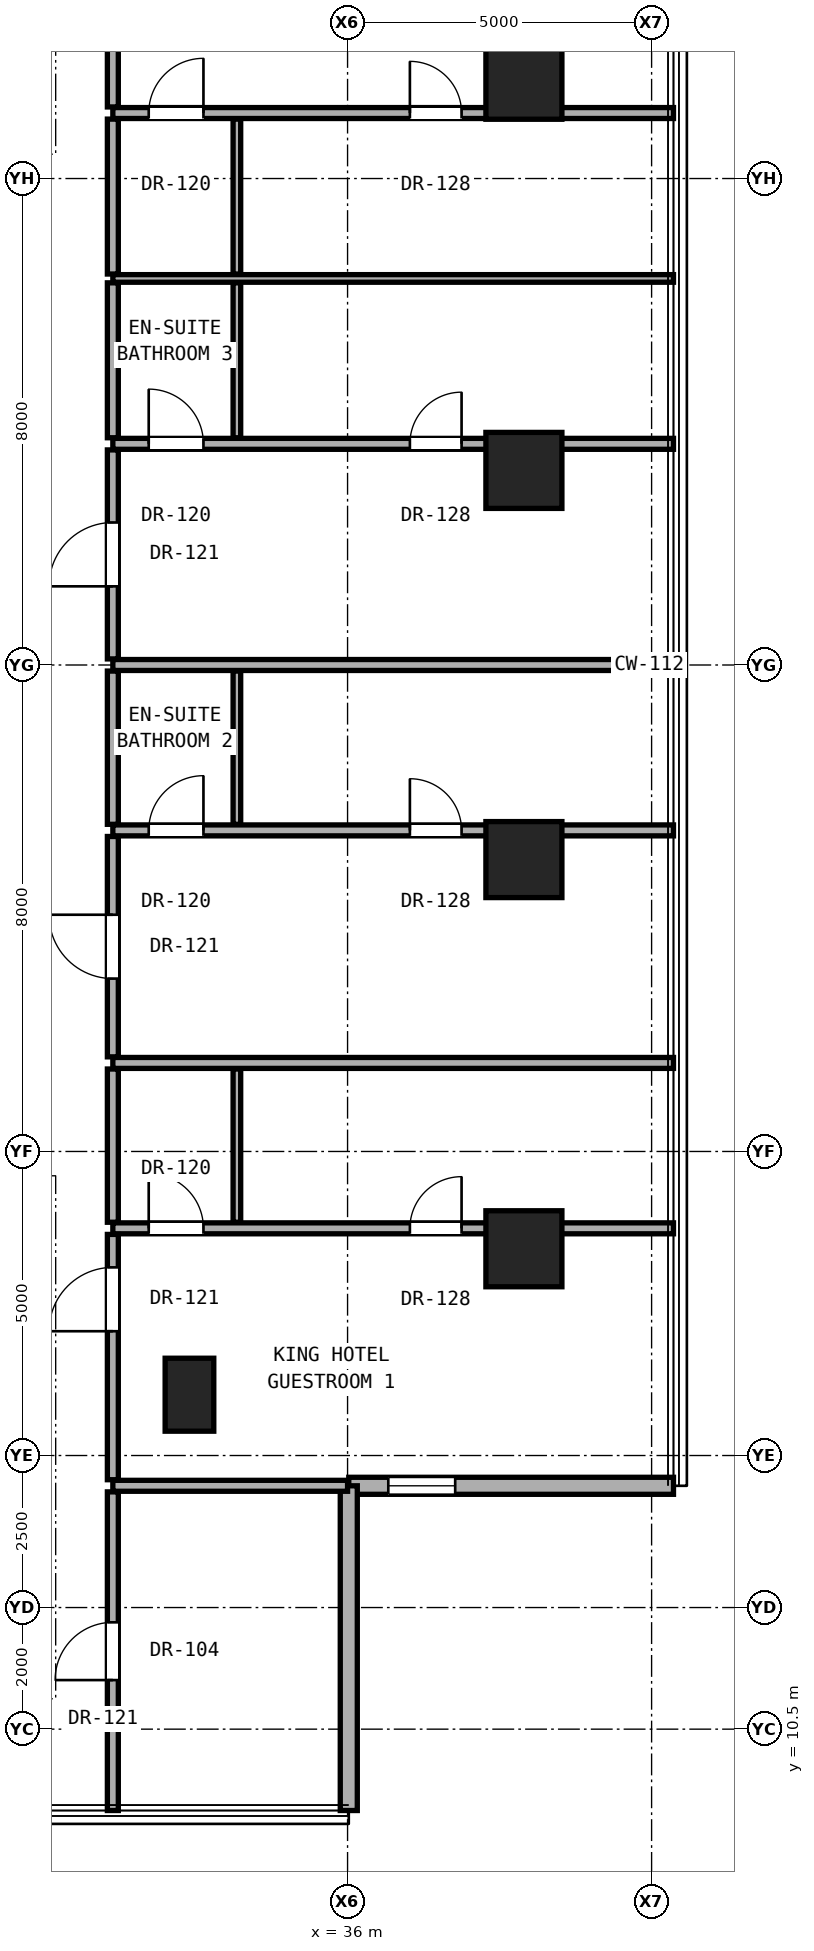
"""IFC4 building model, lengths in metres.
Left out: names, types, materials, properties, quantities, classifications, styles, units other than length and angle.
Written with IfcOpenShell. Run it as: python <this file> out.ifc"""

import sys

from ifc_helpers import new_model, si_unit, direction, frame, frame_2d, origin, origin_2d, place, context, subcontext, project, spatial, rectangle, hollow_rectangle, extrude, element, fill, save


model = new_model("IFC4")
c1 = context("Model", 3, precision=1e-05, world=origin(), true_north=direction((0.0, 1.0)))
c2 = subcontext(c1, "Body", "Model", "MODEL_VIEW")
j1 = project(units=[si_unit("LENGTHUNIT", "METRE"), si_unit("PLANEANGLEUNIT", "RADIAN")], contexts=[c1])
p1 = place(None, origin())
s1 = spatial("IfcSite", under=j1, at=p1, CompositionType="ELEMENT")
p2 = place(p1, origin())
s2 = spatial("IfcBuilding", under=s1, at=p2, CompositionType="ELEMENT")
p3 = place(p2, frame((0.0, 0.0, 55.4)))
s3 = spatial("IfcBuildingStorey", under=s2, at=p3, CompositionType="ELEMENT", Elevation=55.4)
for number, where, z_axis, x_axis in (
    (1, (38.9, 18.4, 0.0), (0.0, 0.0, 1.0), (1.0, 0.0, 0.0)),
    (2, (38.9, 24.8, 0.0), (0.0, 0.0, 1.0), (1.0, 0.0, 0.0)),
    (3, (38.9, 31.2, 0.0), (0.0, 0.0, 1.0), (1.0, 0.0, 0.0)),
    (4, (38.9, 37.6, 0.0), (0.0, 0.0, 1.0), (1.0, 0.0, 0.0)),
):
    element("IfcColumn", number, at=place(p3, frame(where, z_axis=z_axis, x_axis=x_axis)), inside=s3, PredefinedType="COLUMN", context=c2, shape_type="SweptSolid", body=[
        extrude(hollow_rectangle(XDim=1.25, YDim=1.25, WallThickness=0.07, at=origin_2d()), origin(), (0.0, 0.0, 1.0), 3.3),
    ])
p4 = place(p3, frame((33.4, 16.0, 0.0), z_axis=(0.0, 0.0, 1.0), x_axis=(1.0, 0.0, 0.0)))
e5 = element("IfcColumn", 5, at=p4, inside=s3, PredefinedType="PILASTER", context=c2, shape_type="SweptSolid", body=[
    extrude(rectangle(XDim=0.8, YDim=1.2, at=origin_2d()), origin(), (0.0, 0.0, 1.0), 3.3),
])
p5 = place(p3, frame((36.02, 14.502, 0.0), z_axis=(0.0, 0.0, 1.0), x_axis=(1.0, 0.0, 0.0)))
e6 = element("IfcWall", 6, at=p5, inside=s3, PredefinedType="SOLIDWALL", context=c2, shape_type="SweptSolid", body=[
    extrude(rectangle(XDim=5.34, YDim=0.28, at=frame_2d((2.67, 0.0))), origin(), (0.0, 0.0, 1.0), 3.04),
])
p6 = place(p5, frame((0.65, 0.0, 0.85)))
e7 = element("IfcOpeningElement", 7, at=p6, cuts=e6, PredefinedType="OPENING", context=c2, shape_type="SweptSolid", body=[
    extrude(rectangle(XDim=1.1, YDim=2.0, at=frame_2d((0.55, 1.0))), frame((0.0, 0.15, 0.0), z_axis=(0.0, -1.0, 0.0), x_axis=(1.0, 0.0, 0.0)), (0.0, 0.0, 1.0), 0.3),
])
p7 = place(p3, frame((36.02, 9.162, 0.0), z_axis=(0.0, 0.0, 1.0), x_axis=(0.0, 1.0, 0.0)))
e8 = element("IfcWall", 8, at=p7, inside=s3, PredefinedType="SOLIDWALL", context=c2, shape_type="SweptSolid", body=[
    extrude(rectangle(XDim=5.34, YDim=0.28, at=frame_2d((2.67, 0.0))), origin(), (0.0, 0.0, 1.0), 3.04),
])
p8 = place(p3, frame((32.14, 14.502, 0.0), z_axis=(0.0, 0.0, 1.0), x_axis=(1.0, 0.0, 0.0)))
e9 = element("IfcWall", 9, at=p8, inside=s3, PredefinedType="PARTITIONING", context=c2, shape_type="SweptSolid", body=[
    extrude(rectangle(XDim=3.86, YDim=0.18, at=frame_2d((1.93, 0.0))), origin(), (0.0, 0.0, 1.0), 3.06),
])
p9 = place(p3, frame((32.14, 18.736, 0.0), z_axis=(0.0, 0.0, 1.0), x_axis=(1.0, 0.0, 0.0)))
e10 = element("IfcWall", 10, at=p9, inside=s3, PredefinedType="PARTITIONING", context=c2, shape_type="SweptSolid", body=[
    extrude(rectangle(XDim=9.22, YDim=0.18, at=frame_2d((4.61, 0.0))), origin(), (0.0, 0.0, 1.0), 2.125),
])
p10 = place(p9, frame((4.885, 0.0, 0.0)))
e11 = element("IfcOpeningElement", 11, at=p10, cuts=e10, PredefinedType="OPENING", context=c2, shape_type="SweptSolid", body=[
    extrude(rectangle(XDim=0.85, YDim=2.01, at=frame_2d((0.425, 1.005))), frame((0.0, 0.1, 0.0), z_axis=(0.0, -1.0, 0.0), x_axis=(1.0, 0.0, 0.0)), (0.0, 0.0, 1.0), 0.2),
])
p11 = place(p9, frame((0.59, 0.0, 0.0)))
e12 = element("IfcOpeningElement", 12, at=p11, cuts=e10, PredefinedType="OPENING", context=c2, shape_type="SweptSolid", body=[
    extrude(rectangle(XDim=0.9, YDim=2.1, at=frame_2d((0.45, 1.05))), frame((0.0, 0.1, 0.0), z_axis=(0.0, -1.0, 0.0), x_axis=(1.0, 0.0, 0.0)), (0.0, 0.0, 1.0), 0.2),
])
p12 = place(p3, frame((32.14, 21.456, 0.0), z_axis=(0.0, 0.0, 1.0), x_axis=(1.0, 0.0, 0.0)))
e13 = element("IfcWall", 13, at=p12, inside=s3, PredefinedType="PARTITIONING", context=c2, shape_type="SweptSolid", body=[
    extrude(rectangle(XDim=9.22, YDim=0.18, at=frame_2d((4.61, 0.0))), origin(), (0.0, 0.0, 1.0), 2.125),
])
p13 = place(p3, frame((32.14, 25.28, 0.0), z_axis=(0.0, 0.0, 1.0), x_axis=(1.0, 0.0, 0.0)))
e14 = element("IfcWall", 14, at=p13, inside=s3, PredefinedType="PARTITIONING", context=c2, shape_type="SweptSolid", body=[
    extrude(rectangle(XDim=9.22, YDim=0.18, at=frame_2d((4.61, 0.0))), origin(), (0.0, 0.0, 1.0), 2.125),
])
p14 = place(p13, frame((4.885, 0.0, 0.0)))
e15 = element("IfcOpeningElement", 15, at=p14, cuts=e14, PredefinedType="OPENING", context=c2, shape_type="SweptSolid", body=[
    extrude(rectangle(XDim=0.85, YDim=2.01, at=frame_2d((0.425, 1.005))), frame((0.0, 0.1, 0.0), z_axis=(0.0, -1.0, 0.0), x_axis=(1.0, 0.0, 0.0)), (0.0, 0.0, 1.0), 0.2),
])
p15 = place(p13, frame((0.59, 0.0, 0.0)))
e16 = element("IfcOpeningElement", 16, at=p15, cuts=e14, PredefinedType="OPENING", context=c2, shape_type="SweptSolid", body=[
    extrude(rectangle(XDim=0.9, YDim=2.1, at=frame_2d((0.45, 1.05))), frame((0.0, 0.1, 0.0), z_axis=(0.0, -1.0, 0.0), x_axis=(1.0, 0.0, 0.0)), (0.0, 0.0, 1.0), 0.2),
])
p16 = place(p3, frame((32.14, 28.0, 0.0), z_axis=(0.0, 0.0, 1.0), x_axis=(1.0, 0.0, 0.0)))
e17 = element("IfcWall", 17, at=p16, inside=s3, PredefinedType="PARTITIONING", context=c2, shape_type="SweptSolid", body=[
    extrude(rectangle(XDim=9.22, YDim=0.18, at=frame_2d((4.61, 0.0))), origin(), (0.0, 0.0, 1.0), 2.125),
])
p17 = place(p3, frame((32.14, 31.637, 0.0), z_axis=(0.0, 0.0, 1.0), x_axis=(1.0, 0.0, 0.0)))
e18 = element("IfcWall", 18, at=p17, inside=s3, PredefinedType="PARTITIONING", context=c2, shape_type="SweptSolid", body=[
    extrude(rectangle(XDim=9.22, YDim=0.18, at=frame_2d((4.61, 0.0))), origin(), (0.0, 0.0, 1.0), 2.125),
])
p18 = place(p17, frame((4.885, 0.0, 0.0)))
e19 = element("IfcOpeningElement", 19, at=p18, cuts=e18, PredefinedType="OPENING", context=c2, shape_type="SweptSolid", body=[
    extrude(rectangle(XDim=0.85, YDim=2.01, at=frame_2d((0.425, 1.005))), frame((0.0, 0.1, 0.0), z_axis=(0.0, -1.0, 0.0), x_axis=(1.0, 0.0, 0.0)), (0.0, 0.0, 1.0), 0.2),
])
p19 = place(p17, frame((0.59, 0.0, 0.0)))
e20 = element("IfcOpeningElement", 20, at=p19, cuts=e18, PredefinedType="OPENING", context=c2, shape_type="SweptSolid", body=[
    extrude(rectangle(XDim=0.9, YDim=2.1, at=frame_2d((0.45, 1.05))), frame((0.0, 0.1, 0.0), z_axis=(0.0, -1.0, 0.0), x_axis=(1.0, 0.0, 0.0)), (0.0, 0.0, 1.0), 0.2),
])
p20 = place(p3, frame((32.14, 34.357, 0.0), z_axis=(0.0, 0.0, 1.0), x_axis=(1.0, 0.0, 0.0)))
e21 = element("IfcWall", 21, at=p20, inside=s3, PredefinedType="PARTITIONING", context=c2, shape_type="SweptSolid", body=[
    extrude(rectangle(XDim=9.22, YDim=0.125, at=frame_2d((4.61, 0.0))), origin(), (0.0, 0.0, 1.0), 2.125),
])
p21 = place(p3, frame((32.14, 37.077, 0.0), z_axis=(0.0, 0.0, 1.0), x_axis=(1.0, 0.0, 0.0)))
e22 = element("IfcWall", 22, at=p21, inside=s3, PredefinedType="PARTITIONING", context=c2, shape_type="SweptSolid", body=[
    extrude(rectangle(XDim=9.22, YDim=0.18, at=frame_2d((4.61, 0.0))), origin(), (0.0, 0.0, 1.0), 2.125),
])
p22 = place(p21, frame((4.885, 0.0, 0.0)))
e23 = element("IfcOpeningElement", 23, at=p22, cuts=e22, PredefinedType="OPENING", context=c2, shape_type="SweptSolid", body=[
    extrude(rectangle(XDim=0.85, YDim=2.01, at=frame_2d((0.425, 1.005))), frame((0.0, 0.1, 0.0), z_axis=(0.0, -1.0, 0.0), x_axis=(1.0, 0.0, 0.0)), (0.0, 0.0, 1.0), 0.2),
])
p23 = place(p21, frame((0.59, 0.0, 0.0)))
e24 = element("IfcOpeningElement", 24, at=p23, cuts=e22, PredefinedType="OPENING", context=c2, shape_type="SweptSolid", body=[
    extrude(rectangle(XDim=0.9, YDim=2.1, at=frame_2d((0.45, 1.05))), frame((0.0, 0.1, 0.0), z_axis=(0.0, -1.0, 0.0), x_axis=(1.0, 0.0, 0.0)), (0.0, 0.0, 1.0), 0.2),
])
p24 = place(p3, frame((32.14, 9.162, 0.0), z_axis=(0.0, 0.0, 1.0), x_axis=(0.0, 1.0, 0.0)))
e25 = element("IfcWall", 25, at=p24, inside=s3, PredefinedType="PARTITIONING", context=c2, shape_type="SweptSolid", body=[
    extrude(rectangle(XDim=5.24, YDim=0.18, at=frame_2d((2.62, 0.0))), origin(), (0.0, 0.0, 1.0), 3.06),
])
p25 = place(p24, frame((2.145, 0.0, 0.0)))
e26 = element("IfcOpeningElement", 26, at=p25, cuts=e25, PredefinedType="OPENING", context=c2, shape_type="SweptSolid", body=[
    extrude(rectangle(XDim=0.95, YDim=2.15, at=frame_2d((0.475, 1.075))), frame((0.0, 0.1, 0.0), z_axis=(0.0, -1.0, 0.0), x_axis=(1.0, 0.0, 0.0)), (0.0, 0.0, 1.0), 0.2),
])
p26 = place(p3, frame((32.14, 14.602, 0.0), z_axis=(0.0, 0.0, 1.0), x_axis=(0.0, 1.0, 0.0)))
e27 = element("IfcWall", 27, at=p26, inside=s3, PredefinedType="PARTITIONING", context=c2, shape_type="SweptSolid", body=[
    extrude(rectangle(XDim=4.034, YDim=0.18, at=frame_2d((2.017, 0.0))), origin(), (0.0, 0.0, 1.0), 2.436),
])
p27 = place(p26, frame((2.442, 0.0, 0.0)))
e28 = element("IfcOpeningElement", 28, at=p27, cuts=e27, PredefinedType="OPENING", context=c2, shape_type="SweptSolid", body=[
    extrude(rectangle(XDim=1.05, YDim=2.2, at=frame_2d((0.525, 1.1))), frame((0.0, 0.1, 0.0), z_axis=(0.0, -1.0, 0.0), x_axis=(1.0, 0.0, 0.0)), (0.0, 0.0, 1.0), 0.2),
])
p28 = place(p3, frame((32.14, 18.836, 0.0), z_axis=(0.0, 0.0, 1.0), x_axis=(0.0, 1.0, 0.0)))
e29 = element("IfcWall", 29, at=p28, inside=s3, PredefinedType="PARTITIONING", context=c2, shape_type="SweptSolid", body=[
    extrude(rectangle(XDim=2.52, YDim=0.18, at=frame_2d((1.26, 0.0))), origin(), (0.0, 0.0, 1.0), 3.06),
])
p29 = place(p3, frame((32.14, 21.556, 0.0), z_axis=(0.0, 0.0, 1.0), x_axis=(0.0, 1.0, 0.0)))
e30 = element("IfcWall", 30, at=p29, inside=s3, PredefinedType="PARTITIONING", context=c2, shape_type="SweptSolid", body=[
    extrude(rectangle(XDim=3.624, YDim=0.18, at=frame_2d((1.812, 0.0))), origin(), (0.0, 0.0, 1.0), 2.279),
])
p30 = place(p29, frame((1.287, 0.0, 0.0)))
e31 = element("IfcOpeningElement", 31, at=p30, cuts=e30, PredefinedType="OPENING", context=c2, shape_type="SweptSolid", body=[
    extrude(rectangle(XDim=1.05, YDim=2.2, at=frame_2d((0.525, 1.1))), frame((0.0, 0.1, 0.0), z_axis=(0.0, -1.0, 0.0), x_axis=(1.0, 0.0, 0.0)), (0.0, 0.0, 1.0), 0.2),
])
p31 = place(p3, frame((32.14, 25.38, 0.0), z_axis=(0.0, 0.0, 1.0), x_axis=(0.0, 1.0, 0.0)))
e32 = element("IfcWall", 32, at=p31, inside=s3, PredefinedType="PARTITIONING", context=c2, shape_type="SweptSolid", body=[
    extrude(rectangle(XDim=2.52, YDim=0.18, at=frame_2d((1.26, 0.0))), origin(), (0.0, 0.0, 1.0), 3.06),
])
p32 = place(p3, frame((32.14, 28.1, 0.0), z_axis=(0.0, 0.0, 1.0), x_axis=(0.0, 1.0, 0.0)))
e33 = element("IfcWall", 33, at=p32, inside=s3, PredefinedType="PARTITIONING", context=c2, shape_type="SweptSolid", body=[
    extrude(rectangle(XDim=3.437, YDim=0.18, at=frame_2d((1.719, 0.0))), origin(), (0.0, 0.0, 1.0), 2.279),
])
p33 = place(p32, frame((1.194, 0.0, 0.0)))
e34 = element("IfcOpeningElement", 34, at=p33, cuts=e33, PredefinedType="OPENING", context=c2, shape_type="SweptSolid", body=[
    extrude(rectangle(XDim=1.05, YDim=2.2, at=frame_2d((0.525, 1.1))), frame((0.0, 0.1, 0.0), z_axis=(0.0, -1.0, 0.0), x_axis=(1.0, 0.0, 0.0)), (0.0, 0.0, 1.0), 0.2),
])
p34 = place(p3, frame((32.14, 31.737, 0.0), z_axis=(0.0, 0.0, 1.0), x_axis=(0.0, 1.0, 0.0)))
e35 = element("IfcWall", 35, at=p34, inside=s3, PredefinedType="PARTITIONING", context=c2, shape_type="SweptSolid", body=[
    extrude(rectangle(XDim=2.547, YDim=0.18, at=frame_2d((1.274, 0.0))), origin(), (0.0, 0.0, 1.0), 3.06),
])
p35 = place(p3, frame((32.14, 34.429, 0.0), z_axis=(0.0, 0.0, 1.0), x_axis=(0.0, 1.0, 0.0)))
e36 = element("IfcWall", 36, at=p35, inside=s3, PredefinedType="PARTITIONING", context=c2, shape_type="SweptSolid", body=[
    extrude(rectangle(XDim=2.548, YDim=0.18, at=frame_2d((1.274, 0.0))), origin(), (0.0, 0.0, 1.0), 3.06),
])
p36 = place(p3, frame((32.14, 37.177, 0.0), z_axis=(0.0, 0.0, 1.0), x_axis=(0.0, 1.0, 0.0)))
e37 = element("IfcWall", 37, at=p36, inside=s3, PredefinedType="PARTITIONING", context=c2, shape_type="SweptSolid", body=[
    extrude(rectangle(XDim=4.221, YDim=0.18, at=frame_2d((2.11, 0.0))), origin(), (0.0, 0.0, 1.0), 2.436),
])
p37 = place(p36, frame((0.986, 0.0, 0.0)))
e38 = element("IfcOpeningElement", 38, at=p37, cuts=e37, PredefinedType="OPENING", context=c2, shape_type="SweptSolid", body=[
    extrude(rectangle(XDim=1.05, YDim=2.2, at=frame_2d((0.525, 1.1))), frame((0.0, 0.1, 0.0), z_axis=(0.0, -1.0, 0.0), x_axis=(1.0, 0.0, 0.0)), (0.0, 0.0, 1.0), 0.2),
])
for number, where, z_axis, x_axis in (
    (39, (34.18, 18.836, 0.0), (0.0, 0.0, 1.0), (0.0, 1.0, 0.0)),
    (40, (34.18, 25.38, 0.0), (0.0, 0.0, 1.0), (0.0, 1.0, 0.0)),
):
    element("IfcWall", number, at=place(p3, frame(where, z_axis=z_axis, x_axis=x_axis)), inside=s3, PredefinedType="PARTITIONING", context=c2, shape_type="SweptSolid", body=[
        extrude(rectangle(XDim=2.52, YDim=0.125, at=frame_2d((1.26, 0.0))), origin(), (0.0, 0.0, 1.0), 3.06),
    ])
p38 = place(p3, frame((34.18, 31.737, 0.0), z_axis=(0.0, 0.0, 1.0), x_axis=(0.0, 1.0, 0.0)))
e41 = element("IfcWall", 41, at=p38, inside=s3, PredefinedType="PARTITIONING", context=c2, shape_type="SweptSolid", body=[
    extrude(rectangle(XDim=2.547, YDim=0.125, at=frame_2d((1.274, 0.0))), origin(), (0.0, 0.0, 1.0), 3.06),
])
p39 = place(p3, frame((34.18, 34.429, 0.0), z_axis=(0.0, 0.0, 1.0), x_axis=(0.0, 1.0, 0.0)))
e42 = element("IfcWall", 42, at=p39, inside=s3, PredefinedType="PARTITIONING", context=c2, shape_type="SweptSolid", body=[
    extrude(rectangle(XDim=2.548, YDim=0.125, at=frame_2d((1.274, 0.0))), origin(), (0.0, 0.0, 1.0), 3.06),
])
p40 = place(p6, origin())
e43 = element("IfcWindow", 43, at=p40, inside=s3, PartitioningType="SINGLE_PANEL", PredefinedType="WINDOW", context=c2, shape_type="SweptSolid", body=[
    extrude(rectangle(XDim=1.1, YDim=2.0, at=frame_2d((0.55, 1.0))), frame((0.0, 0.03, 0.0), z_axis=(0.0, -1.0, 0.0), x_axis=(1.0, 0.0, 0.0)), (0.0, 0.0, 1.0), 0.06),
])
fill(e7, e43)
p41 = place(p27, origin())
e44 = element("IfcDoor", 44, at=p41, inside=s3, OperationType="SINGLE_SWING_LEFT", PredefinedType="DOOR", context=c2, shape_type="SweptSolid", body=[
    extrude(rectangle(XDim=1.05, YDim=2.2, at=frame_2d((0.525, 1.1))), frame((0.0, 0.025, 0.0), z_axis=(0.0, -1.0, 0.0), x_axis=(1.0, 0.0, 0.0)), (0.0, 0.0, 1.0), 0.05),
])
fill(e28, e44)
p42 = place(p10, origin())
e45 = element("IfcDoor", 45, at=p42, inside=s3, OperationType="SINGLE_SWING_RIGHT", PredefinedType="DOOR", context=c2, shape_type="SweptSolid", body=[
    extrude(rectangle(XDim=0.85, YDim=2.01, at=frame_2d((0.425, 1.005))), frame((0.0, 0.025, 0.0), z_axis=(0.0, -1.0, 0.0), x_axis=(1.0, 0.0, 0.0)), (0.0, 0.0, 1.0), 0.05),
])
fill(e11, e45)
p43 = place(p11, origin())
e46 = element("IfcDoor", 46, at=p43, inside=s3, OperationType="SINGLE_SWING_LEFT", PredefinedType="DOOR", context=c2, shape_type="SweptSolid", body=[
    extrude(rectangle(XDim=0.9, YDim=2.1, at=frame_2d((0.45, 1.05))), frame((0.0, 0.025, 0.0), z_axis=(0.0, -1.0, 0.0), x_axis=(1.0, 0.0, 0.0)), (0.0, 0.0, 1.0), 0.05),
])
fill(e12, e46)
p44 = place(p30, origin())
e47 = element("IfcDoor", 47, at=p44, inside=s3, OperationType="SINGLE_SWING_RIGHT", PredefinedType="DOOR", context=c2, shape_type="SweptSolid", body=[
    extrude(rectangle(XDim=1.05, YDim=2.2, at=frame_2d((0.525, 1.1))), frame((0.0, 0.025, 0.0), z_axis=(0.0, -1.0, 0.0), x_axis=(1.0, 0.0, 0.0)), (0.0, 0.0, 1.0), 0.05),
])
fill(e31, e47)
p45 = place(p14, origin())
e48 = element("IfcDoor", 48, at=p45, inside=s3, OperationType="SINGLE_SWING_LEFT", PredefinedType="DOOR", context=c2, shape_type="SweptSolid", body=[
    extrude(rectangle(XDim=0.85, YDim=2.01, at=frame_2d((0.425, 1.005))), frame((0.0, 0.025, 0.0), z_axis=(0.0, -1.0, 0.0), x_axis=(1.0, 0.0, 0.0)), (0.0, 0.0, 1.0), 0.05),
])
fill(e15, e48)
p46 = place(p15, origin())
e49 = element("IfcDoor", 49, at=p46, inside=s3, OperationType="SINGLE_SWING_RIGHT", PredefinedType="DOOR", context=c2, shape_type="SweptSolid", body=[
    extrude(rectangle(XDim=0.9, YDim=2.1, at=frame_2d((0.45, 1.05))), frame((0.0, 0.025, 0.0), z_axis=(0.0, -1.0, 0.0), x_axis=(1.0, 0.0, 0.0)), (0.0, 0.0, 1.0), 0.05),
])
fill(e16, e49)
p47 = place(p33, origin())
e50 = element("IfcDoor", 50, at=p47, inside=s3, OperationType="SINGLE_SWING_LEFT", PredefinedType="DOOR", context=c2, shape_type="SweptSolid", body=[
    extrude(rectangle(XDim=1.05, YDim=2.2, at=frame_2d((0.525, 1.1))), frame((0.0, 0.025, 0.0), z_axis=(0.0, -1.0, 0.0), x_axis=(1.0, 0.0, 0.0)), (0.0, 0.0, 1.0), 0.05),
])
fill(e34, e50)
p48 = place(p18, origin())
e51 = element("IfcDoor", 51, at=p48, inside=s3, OperationType="SINGLE_SWING_RIGHT", PredefinedType="DOOR", context=c2, shape_type="SweptSolid", body=[
    extrude(rectangle(XDim=0.85, YDim=2.01, at=frame_2d((0.425, 1.005))), frame((0.0, 0.025, 0.0), z_axis=(0.0, -1.0, 0.0), x_axis=(1.0, 0.0, 0.0)), (0.0, 0.0, 1.0), 0.05),
])
fill(e19, e51)
p49 = place(p19, origin())
e52 = element("IfcDoor", 52, at=p49, inside=s3, OperationType="SINGLE_SWING_LEFT", PredefinedType="DOOR", context=c2, shape_type="SweptSolid", body=[
    extrude(rectangle(XDim=0.9, YDim=2.1, at=frame_2d((0.45, 1.05))), frame((0.0, 0.025, 0.0), z_axis=(0.0, -1.0, 0.0), x_axis=(1.0, 0.0, 0.0)), (0.0, 0.0, 1.0), 0.05),
])
fill(e20, e52)
p50 = place(p22, origin())
e53 = element("IfcDoor", 53, at=p50, inside=s3, OperationType="SINGLE_SWING_LEFT", PredefinedType="DOOR", context=c2, shape_type="SweptSolid", body=[
    extrude(rectangle(XDim=0.85, YDim=2.01, at=frame_2d((0.425, 1.005))), frame((0.0, 0.025, 0.0), z_axis=(0.0, -1.0, 0.0), x_axis=(1.0, 0.0, 0.0)), (0.0, 0.0, 1.0), 0.05),
])
fill(e23, e53)
p51 = place(p23, origin())
e54 = element("IfcDoor", 54, at=p51, inside=s3, OperationType="SINGLE_SWING_RIGHT", PredefinedType="DOOR", context=c2, shape_type="SweptSolid", body=[
    extrude(rectangle(XDim=0.9, YDim=2.1, at=frame_2d((0.45, 1.05))), frame((0.0, 0.025, 0.0), z_axis=(0.0, -1.0, 0.0), x_axis=(1.0, 0.0, 0.0)), (0.0, 0.0, 1.0), 0.05),
])
fill(e24, e54)
p52 = place(p25, origin())
e55 = element("IfcDoor", 55, at=p52, inside=s3, OperationType="SINGLE_SWING_LEFT", PredefinedType="DOOR", context=c2, shape_type="SweptSolid", body=[
    extrude(rectangle(XDim=0.95, YDim=2.15, at=frame_2d((0.475, 1.075))), frame((0.0, 0.025, 0.0), z_axis=(0.0, -1.0, 0.0), x_axis=(1.0, 0.0, 0.0)), (0.0, 0.0, 1.0), 0.05),
])
fill(e26, e55)
save(model, sys.argv[1])
